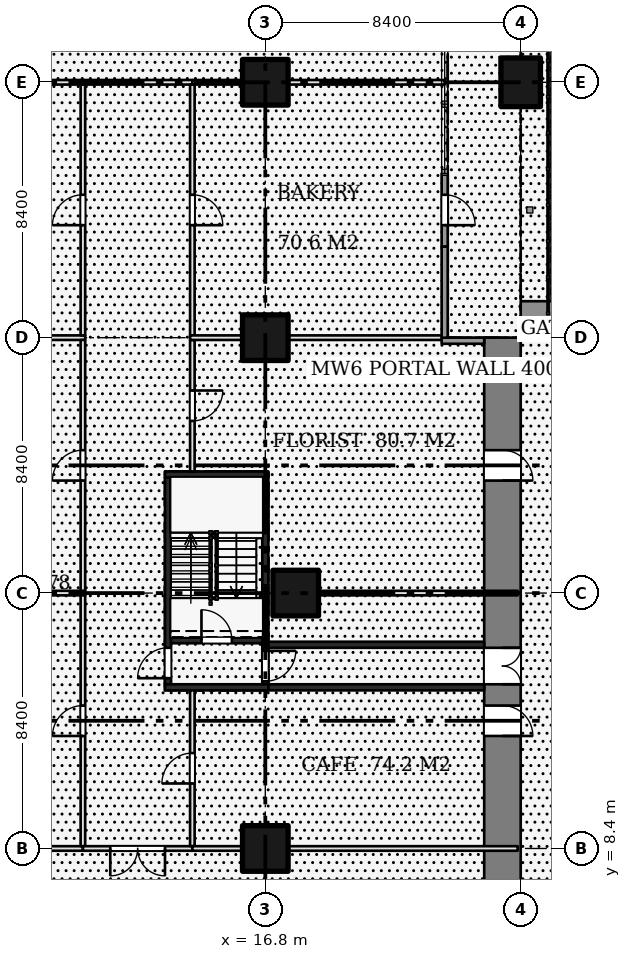
"""IFC4 building model, lengths in metres.
Left out: names, types, materials, properties, quantities, classifications, styles, units other than length and angle.
Written with IfcOpenShell. Run it as: python <this file> out.ifc"""

import sys

from ifc_helpers import new_model, si_unit, direction, frame, frame_2d, origin, origin_2d, place, context, subcontext, project, spatial, polyline, rectangle, outline, extrude, element, fill, save


model = new_model("IFC4")
c1 = context("Model", 3, precision=1e-05, world=origin(), true_north=direction((0.0, 1.0)))
c2 = subcontext(c1, "Body", "Model", "MODEL_VIEW")
j1 = project(units=[si_unit("LENGTHUNIT", "METRE"), si_unit("PLANEANGLEUNIT", "RADIAN")], contexts=[c1])
p1 = place(None, origin())
s1 = spatial("IfcSite", under=j1, at=p1, CompositionType="ELEMENT")
p2 = place(p1, origin())
s2 = spatial("IfcBuilding", under=s1, at=p2, CompositionType="ELEMENT")
p3 = place(p2, origin())
s3 = spatial("IfcBuildingStorey", under=s2, at=p3, CompositionType="ELEMENT", Elevation=0.0)
for number, where, z_axis, x_axis in (
    (1, (16.8, 8.4, 0.0), (0.0, 0.0, 1.0), (1.0, 0.0, 0.0)),
    (2, (17.8, 16.8, 0.0), (0.0, 0.0, 1.0), (1.0, 0.0, 0.0)),
    (3, (16.8, 25.2, 0.0), (0.0, 0.0, 1.0), (1.0, 0.0, 0.0)),
    (4, (16.8, 33.6, 0.0), (0.0, 0.0, 1.0), (1.0, 0.0, 0.0)),
):
    element("IfcColumn", number, at=place(p3, frame(where, z_axis=z_axis, x_axis=x_axis)), inside=s3, PredefinedType="COLUMN", context=c2, shape_type="SweptSolid", body=[
        extrude(rectangle(XDim=1.5, YDim=1.5, at=origin_2d()), origin(), (0.0, 0.0, 1.0), 8.7),
    ])
p4 = place(p3, frame((25.2, 33.6, 0.0), z_axis=(0.0, 0.0, 1.0), x_axis=(0.0, 1.0, 0.0)))
e5 = element("IfcColumn", 5, at=p4, inside=s3, PredefinedType="COLUMN", context=c2, shape_type="SweptSolid", body=[
    extrude(rectangle(XDim=1.6, YDim=1.3, at=origin_2d()), origin(), (0.0, 0.0, 1.0), 8.7),
])
p5 = place(p3, frame((24.6, 0.0, 0.0), z_axis=(0.0, 0.0, 1.0), x_axis=(0.0, 1.0, 0.0)))
e6 = element("IfcWall", 6, at=p5, inside=s3, PredefinedType="SHEAR", context=c2, shape_type="SweptSolid", body=[
    extrude(rectangle(XDim=25.2, YDim=1.2, at=frame_2d((12.6, 0.0))), origin(), (0.0, 0.0, 1.0), 8.7),
])
p6 = place(p5, frame((13.8, 0.0, 0.0)))
e7 = element("IfcOpeningElement", 7, at=p6, cuts=e6, PredefinedType="OPENING", context=c2, shape_type="SweptSolid", body=[
    extrude(rectangle(XDim=1.2, YDim=2.1, at=frame_2d((0.6, 1.05))), frame((0.0, 0.61, 0.0), z_axis=(0.0, -1.0, 0.0), x_axis=(1.0, 0.0, 0.0)), (0.0, 0.0, 1.0), 1.22),
])
p7 = place(p5, frame((12.1, 0.0, 0.0)))
e8 = element("IfcOpeningElement", 8, at=p7, cuts=e6, PredefinedType="OPENING", context=c2, shape_type="SweptSolid", body=[
    extrude(rectangle(XDim=1.0, YDim=2.4, at=frame_2d((0.5, 1.2))), frame((0.0, 0.61, 0.0), z_axis=(0.0, -1.0, 0.0), x_axis=(1.0, 0.0, 0.0)), (0.0, 0.0, 1.0), 1.22),
])
p8 = place(p5, frame((20.5, 0.0, 0.0)))
e9 = element("IfcOpeningElement", 9, at=p8, cuts=e6, PredefinedType="OPENING", context=c2, shape_type="SweptSolid", body=[
    extrude(rectangle(XDim=1.0, YDim=2.4, at=frame_2d((0.5, 1.2))), frame((0.0, 0.61, 0.0), z_axis=(0.0, -1.0, 0.0), x_axis=(1.0, 0.0, 0.0)), (0.0, 0.0, 1.0), 1.22),
])
p9 = place(p3, frame((25.2, 25.8, 9.0), z_axis=(0.0, 1.0, 0.0), x_axis=(1.0, 0.0, 0.0)))
e10 = element("IfcWall", 10, at=p9, inside=s3, PredefinedType="SHEAR", context=c2, shape_type="SweptSolid", body=[
    extrude(outline(polyline([(0.0, 0.0), (2.747, 0.0), (2.413, 0.555), (2.05, 1.305), (1.748, 2.094), (1.51, 2.917), (1.338, 3.764), (1.235, 4.628), (1.2, 5.5), (1.2, 9.15), (0.0, 9.15), (0.0, 0.0)])), origin(), (0.0, 0.0, -1.0), 1.2),
])
p10 = place(p3, frame((13.6, 13.8, 0.0), z_axis=(0.0, 0.0, 1.0), x_axis=(0.0, 1.0, 0.0)))
e11 = element("IfcWall", 11, at=p10, inside=s3, PredefinedType="SHEAR", context=c2, shape_type="SweptSolid", body=[
    extrude(rectangle(XDim=6.8, YDim=0.2, at=frame_2d((3.4, 0.0))), origin(), (0.0, 0.0, 1.0), 8.7),
])
p11 = place(p10, frame((0.2, 0.0, 0.0)))
e12 = element("IfcOpeningElement", 12, at=p11, cuts=e11, PredefinedType="OPENING", context=c2, shape_type="SweptSolid", body=[
    extrude(rectangle(XDim=1.0, YDim=2.1, at=frame_2d((0.5, 1.05))), frame((0.0, 0.11, 0.0), z_axis=(0.0, -1.0, 0.0), x_axis=(1.0, 0.0, 0.0)), (0.0, 0.0, 1.0), 0.22),
])
p12 = place(p3, frame((16.8, 13.8, 0.0), z_axis=(0.0, 0.0, 1.0), x_axis=(0.0, 1.0, 0.0)))
e13 = element("IfcWall", 13, at=p12, inside=s3, PredefinedType="SHEAR", context=c2, shape_type="SweptSolid", body=[
    extrude(rectangle(XDim=6.8, YDim=0.2, at=frame_2d((3.4, 0.0))), origin(), (0.0, 0.0, 1.0), 8.7),
])
p13 = place(p12, frame((0.1, 0.0, 0.0)))
e14 = element("IfcOpeningElement", 14, at=p13, cuts=e13, PredefinedType="OPENING", context=c2, shape_type="SweptSolid", body=[
    extrude(rectangle(XDim=1.0, YDim=2.1, at=frame_2d((0.5, 1.05))), frame((0.0, 0.11, 0.0), z_axis=(0.0, -1.0, 0.0), x_axis=(1.0, 0.0, 0.0)), (0.0, 0.0, 1.0), 0.22),
])
for number, where, z_axis, x_axis in (
    (15, (13.5, 13.7, 0.0), (0.0, 0.0, 1.0), (1.0, 0.0, 0.0)),
    (16, (13.5, 20.7, 0.0), (0.0, 0.0, 1.0), (1.0, 0.0, 0.0)),
):
    element("IfcWall", number, at=place(p3, frame(where, z_axis=z_axis, x_axis=x_axis)), inside=s3, PredefinedType="SHEAR", context=c2, shape_type="SweptSolid", body=[
        extrude(rectangle(XDim=3.4, YDim=0.2, at=frame_2d((1.7, 0.0))), origin(), (0.0, 0.0, 1.0), 8.7),
    ])
p14 = place(p3, frame((13.7, 15.25, 0.0), z_axis=(0.0, 0.0, 1.0), x_axis=(1.0, 0.0, 0.0)))
e17 = element("IfcWall", 17, at=p14, inside=s3, PredefinedType="SHEAR", context=c2, shape_type="SweptSolid", body=[
    extrude(rectangle(XDim=3.0, YDim=0.2, at=frame_2d((1.5, 0.0))), origin(), (0.0, 0.0, 1.0), 8.7),
])
p15 = place(p14, frame((1.0, 0.0, 0.0)))
e18 = element("IfcOpeningElement", 18, at=p15, cuts=e17, PredefinedType="OPENING", context=c2, shape_type="SweptSolid", body=[
    extrude(rectangle(XDim=1.0, YDim=2.1, at=frame_2d((0.5, 1.05))), frame((0.0, 0.11, 0.0), z_axis=(0.0, -1.0, 0.0), x_axis=(1.0, 0.0, 0.0)), (0.0, 0.0, 1.0), 0.22),
])
for number, where, z_axis, x_axis in (
    (19, (16.9, 13.7, 0.0), (0.0, 0.0, 1.0), (1.0, 0.0, 0.0)),
    (20, (16.9, 15.1, 0.0), (0.0, 0.0, 1.0), (1.0, 0.0, 0.0)),
):
    element("IfcWall", number, at=place(p3, frame(where, z_axis=z_axis, x_axis=x_axis)), inside=s3, PredefinedType="SHEAR", context=c2, shape_type="SweptSolid", body=[
        extrude(rectangle(XDim=7.1, YDim=0.2, at=frame_2d((3.55, 0.0))), origin(), (0.0, 0.0, 1.0), 8.7),
    ])
p16 = place(p3, frame((9.15, 8.4, 0.0), z_axis=(0.0, 0.0, 1.0), x_axis=(1.0, 0.0, 0.0)))
e21 = element("IfcWall", 21, at=p16, inside=s3, PredefinedType="PARTITIONING", context=c2, shape_type="SweptSolid", body=[
    extrude(rectangle(XDim=1.65, YDim=0.15, at=frame_2d((0.825, 0.0))), origin(), (0.0, 0.0, 1.0), 8.7),
])
for number, where, z_axis, x_axis in (
    (22, (9.15, 16.8, 0.0), (0.0, 0.0, 1.0), (1.0, 0.0, 0.0)),
    (23, (9.15, 25.2, 0.0), (0.0, 0.0, 1.0), (1.0, 0.0, 0.0)),
):
    element("IfcWall", number, at=place(p3, frame(where, z_axis=z_axis, x_axis=x_axis)), inside=s3, PredefinedType="PARTITIONING", context=c2, shape_type="SweptSolid", body=[
        extrude(rectangle(XDim=1.725, YDim=0.15, at=frame_2d((0.863, 0.0))), origin(), (0.0, 0.0, 1.0), 8.7),
    ])
p17 = place(p3, frame((9.15, 33.6, 0.0), z_axis=(0.0, 0.0, 1.0), x_axis=(1.0, 0.0, 0.0)))
e24 = element("IfcWall", 24, at=p17, inside=s3, PredefinedType="PARTITIONING", context=c2, shape_type="SweptSolid", body=[
    extrude(rectangle(XDim=1.65, YDim=0.15, at=frame_2d((0.825, 0.0))), origin(), (0.0, 0.0, 1.0), 8.7),
])
p18 = place(p3, frame((10.8, 8.475, 0.0), z_axis=(0.0, 0.0, 1.0), x_axis=(0.0, 1.0, 0.0)))
e25 = element("IfcWall", 25, at=p18, inside=s3, PredefinedType="PARTITIONING", context=c2, shape_type="SweptSolid", body=[
    extrude(rectangle(XDim=8.25, YDim=0.15, at=frame_2d((4.125, 0.0))), origin(), (0.0, 0.0, 1.0), 8.7),
])
p19 = place(p18, frame((3.625, 0.0, 0.0)))
e26 = element("IfcOpeningElement", 26, at=p19, cuts=e25, PredefinedType="OPENING", context=c2, shape_type="SweptSolid", body=[
    extrude(rectangle(XDim=1.0, YDim=2.1, at=frame_2d((0.5, 1.05))), frame((0.0, 0.085, 0.0), z_axis=(0.0, -1.0, 0.0), x_axis=(1.0, 0.0, 0.0)), (0.0, 0.0, 1.0), 0.17),
])
p20 = place(p3, frame((10.8, 8.4, 0.0), z_axis=(0.0, 0.0, 1.0), x_axis=(1.0, 0.0, 0.0)))
e27 = element("IfcWall", 27, at=p20, inside=s3, PredefinedType="PARTITIONING", context=c2, shape_type="SweptSolid", body=[
    extrude(rectangle(XDim=3.6, YDim=0.15, at=frame_2d((1.8, 0.0))), origin(), (0.0, 0.0, 1.0), 8.7),
])
p21 = place(p20, frame((0.9, 0.0, 0.0)))
e28 = element("IfcOpeningElement", 28, at=p21, cuts=e27, PredefinedType="OPENING", context=c2, shape_type="SweptSolid", body=[
    extrude(rectangle(XDim=1.8, YDim=2.1, at=frame_2d((0.9, 1.05))), frame((0.0, 0.085, 0.0), z_axis=(0.0, -1.0, 0.0), x_axis=(1.0, 0.0, 0.0)), (0.0, 0.0, 1.0), 0.17),
])
p22 = place(p3, frame((10.8, 16.875, 0.0), z_axis=(0.0, 0.0, 1.0), x_axis=(0.0, 1.0, 0.0)))
e29 = element("IfcWall", 29, at=p22, inside=s3, PredefinedType="PARTITIONING", context=c2, shape_type="SweptSolid", body=[
    extrude(rectangle(XDim=8.25, YDim=0.15, at=frame_2d((4.125, 0.0))), origin(), (0.0, 0.0, 1.0), 8.7),
])
p23 = place(p22, frame((3.625, 0.0, 0.0)))
e30 = element("IfcOpeningElement", 30, at=p23, cuts=e29, PredefinedType="OPENING", context=c2, shape_type="SweptSolid", body=[
    extrude(rectangle(XDim=1.0, YDim=2.1, at=frame_2d((0.5, 1.05))), frame((0.0, 0.085, 0.0), z_axis=(0.0, -1.0, 0.0), x_axis=(1.0, 0.0, 0.0)), (0.0, 0.0, 1.0), 0.17),
])
p24 = place(p3, frame((10.8, 25.275, 0.0), z_axis=(0.0, 0.0, 1.0), x_axis=(0.0, 1.0, 0.0)))
e31 = element("IfcWall", 31, at=p24, inside=s3, PredefinedType="PARTITIONING", context=c2, shape_type="SweptSolid", body=[
    extrude(rectangle(XDim=8.25, YDim=0.15, at=frame_2d((4.125, 0.0))), origin(), (0.0, 0.0, 1.0), 8.7),
])
p25 = place(p24, frame((3.625, 0.0, 0.0)))
e32 = element("IfcOpeningElement", 32, at=p25, cuts=e31, PredefinedType="OPENING", context=c2, shape_type="SweptSolid", body=[
    extrude(rectangle(XDim=1.0, YDim=2.1, at=frame_2d((0.5, 1.05))), frame((0.0, 0.085, 0.0), z_axis=(0.0, -1.0, 0.0), x_axis=(1.0, 0.0, 0.0)), (0.0, 0.0, 1.0), 0.17),
])
p26 = place(p3, frame((10.8, 33.6, 0.0), z_axis=(0.0, 0.0, 1.0), x_axis=(1.0, 0.0, 0.0)))
e33 = element("IfcWall", 33, at=p26, inside=s3, PredefinedType="PARTITIONING", context=c2, shape_type="SweptSolid", body=[
    extrude(rectangle(XDim=3.6, YDim=0.15, at=frame_2d((1.8, 0.0))), origin(), (0.0, 0.0, 1.0), 8.7),
])
p27 = place(p3, frame((14.4, 8.475, 0.0), z_axis=(0.0, 0.0, 1.0), x_axis=(0.0, 1.0, 0.0)))
e34 = element("IfcWall", 34, at=p27, inside=s3, PredefinedType="PARTITIONING", context=c2, shape_type="SweptSolid", body=[
    extrude(rectangle(XDim=5.125, YDim=0.15, at=frame_2d((2.562, 0.0))), origin(), (0.0, 0.0, 1.0), 8.7),
])
p28 = place(p27, frame((2.062, 0.0, 0.0)))
e35 = element("IfcOpeningElement", 35, at=p28, cuts=e34, PredefinedType="OPENING", context=c2, shape_type="SweptSolid", body=[
    extrude(rectangle(XDim=1.0, YDim=2.1, at=frame_2d((0.5, 1.05))), frame((0.0, 0.085, 0.0), z_axis=(0.0, -1.0, 0.0), x_axis=(1.0, 0.0, 0.0)), (0.0, 0.0, 1.0), 0.17),
])
p29 = place(p3, frame((14.4, 8.4, 0.0), z_axis=(0.0, 0.0, 1.0), x_axis=(1.0, 0.0, 0.0)))
e36 = element("IfcWall", 36, at=p29, inside=s3, PredefinedType="PARTITIONING", context=c2, shape_type="SweptSolid", body=[
    extrude(rectangle(XDim=1.65, YDim=0.15, at=frame_2d((0.825, 0.0))), origin(), (0.0, 0.0, 1.0), 8.7),
])
p30 = place(p3, frame((17.55, 8.4, 0.0), z_axis=(0.0, 0.0, 1.0), x_axis=(1.0, 0.0, 0.0)))
e37 = element("IfcWall", 37, at=p30, inside=s3, PredefinedType="PARTITIONING", context=c2, shape_type="SweptSolid", body=[
    extrude(rectangle(XDim=7.55, YDim=0.15, at=frame_2d((3.775, 0.0))), origin(), (0.0, 0.0, 1.0), 8.7),
])
p31 = place(p3, frame((14.4, 20.8, 0.0), z_axis=(0.0, 0.0, 1.0), x_axis=(0.0, 1.0, 0.0)))
e38 = element("IfcWall", 38, at=p31, inside=s3, PredefinedType="PARTITIONING", context=c2, shape_type="SweptSolid", body=[
    extrude(rectangle(XDim=4.325, YDim=0.15, at=frame_2d((2.163, 0.0))), origin(), (0.0, 0.0, 1.0), 8.7),
])
p32 = place(p31, frame((1.663, 0.0, 0.0)))
e39 = element("IfcOpeningElement", 39, at=p32, cuts=e38, PredefinedType="OPENING", context=c2, shape_type="SweptSolid", body=[
    extrude(rectangle(XDim=1.0, YDim=2.1, at=frame_2d((0.5, 1.05))), frame((0.0, 0.085, 0.0), z_axis=(0.0, -1.0, 0.0), x_axis=(1.0, 0.0, 0.0)), (0.0, 0.0, 1.0), 0.17),
])
p33 = place(p3, frame((14.4, 25.275, 0.0), z_axis=(0.0, 0.0, 1.0), x_axis=(0.0, 1.0, 0.0)))
e40 = element("IfcWall", 40, at=p33, inside=s3, PredefinedType="PARTITIONING", context=c2, shape_type="SweptSolid", body=[
    extrude(rectangle(XDim=8.25, YDim=0.15, at=frame_2d((4.125, 0.0))), origin(), (0.0, 0.0, 1.0), 8.7),
])
p34 = place(p33, frame((3.625, 0.0, 0.0)))
e41 = element("IfcOpeningElement", 41, at=p34, cuts=e40, PredefinedType="OPENING", context=c2, shape_type="SweptSolid", body=[
    extrude(rectangle(XDim=1.0, YDim=2.1, at=frame_2d((0.5, 1.05))), frame((0.0, 0.085, 0.0), z_axis=(0.0, -1.0, 0.0), x_axis=(1.0, 0.0, 0.0)), (0.0, 0.0, 1.0), 0.17),
])
p35 = place(p3, frame((14.325, 25.2, 0.0), z_axis=(0.0, 0.0, 1.0), x_axis=(1.0, 0.0, 0.0)))
e42 = element("IfcWall", 42, at=p35, inside=s3, PredefinedType="PARTITIONING", context=c2, shape_type="SweptSolid", body=[
    extrude(rectangle(XDim=1.725, YDim=0.15, at=frame_2d((0.863, 0.0))), origin(), (0.0, 0.0, 1.0), 8.7),
])
p36 = place(p3, frame((17.55, 25.2, 0.0), z_axis=(0.0, 0.0, 1.0), x_axis=(1.0, 0.0, 0.0)))
e43 = element("IfcWall", 43, at=p36, inside=s3, PredefinedType="PARTITIONING", context=c2, shape_type="SweptSolid", body=[
    extrude(rectangle(XDim=5.15, YDim=0.15, at=frame_2d((2.575, 0.0))), origin(), (0.0, 0.0, 1.0), 8.7),
])
p37 = place(p3, frame((14.4, 33.6, 0.0), z_axis=(0.0, 0.0, 1.0), x_axis=(1.0, 0.0, 0.0)))
e44 = element("IfcWall", 44, at=p37, inside=s3, PredefinedType="PARTITIONING", context=c2, shape_type="SweptSolid", body=[
    extrude(rectangle(XDim=1.65, YDim=0.15, at=frame_2d((0.825, 0.0))), origin(), (0.0, 0.0, 1.0), 8.7),
])
p38 = place(p3, frame((17.55, 33.6, 0.0), z_axis=(0.0, 0.0, 1.0), x_axis=(1.0, 0.0, 0.0)))
e45 = element("IfcWall", 45, at=p38, inside=s3, PredefinedType="PARTITIONING", context=c2, shape_type="SweptSolid", body=[
    extrude(rectangle(XDim=5.15, YDim=0.15, at=frame_2d((2.575, 0.0))), origin(), (0.0, 0.0, 1.0), 8.7),
])
p39 = place(p3, frame((18.55, 16.8, 0.0), z_axis=(0.0, 0.0, 1.0), x_axis=(1.0, 0.0, 0.0)))
e46 = element("IfcWall", 46, at=p39, inside=s3, PredefinedType="PARTITIONING", context=c2, shape_type="SweptSolid", body=[
    extrude(rectangle(XDim=6.55, YDim=0.15, at=frame_2d((3.275, 0.0))), origin(), (0.0, 0.0, 1.0), 8.7),
])
p40 = place(p3, frame((24.0, 25.1, 0.0), z_axis=(0.0, 0.0, 1.0), x_axis=(-1.0, 0.0, 0.0)))
e47 = element("IfcWall", 47, at=p40, inside=s3, PredefinedType="SOLIDWALL", context=c2, shape_type="SweptSolid", body=[
    extrude(rectangle(XDim=1.4, YDim=0.2, at=frame_2d((0.7, 0.0))), origin(), (0.0, 0.0, 1.0), 8.7),
])
p41 = place(p3, frame((22.7, 25.2, 0.0), z_axis=(0.0, 0.0, 1.0), x_axis=(0.0, 1.0, 0.0)))
e48 = element("IfcWall", 48, at=p41, inside=s3, PredefinedType="SOLIDWALL", context=c2, shape_type="SweptSolid", body=[
    extrude(rectangle(XDim=3.0, YDim=0.2, at=frame_2d((1.5, 0.0))), origin(), (0.0, 0.0, 1.0), 8.7),
])
p42 = place(p3, frame((22.7, 28.2, 0.0), z_axis=(0.0, 0.0, 1.0), x_axis=(0.0, 1.0, 0.0)))
e49 = element("IfcWall", 49, at=p42, inside=s3, PredefinedType="SOLIDWALL", context=c2, shape_type="SweptSolid", body=[
    extrude(rectangle(XDim=2.4, YDim=0.2, at=frame_2d((1.2, 0.0))), origin(), (0.0, 0.0, 1.0), 8.7),
])
p43 = place(p42, frame((0.7, 0.0, 0.0)))
e50 = element("IfcOpeningElement", 50, at=p43, cuts=e49, PredefinedType="OPENING", context=c2, shape_type="SweptSolid", body=[
    extrude(rectangle(XDim=1.0, YDim=2.4, at=frame_2d((0.5, 1.2))), frame((0.0, 0.11, 0.0), z_axis=(0.0, -1.0, 0.0), x_axis=(1.0, 0.0, 0.0)), (0.0, 0.0, 1.0), 0.22),
])
p44 = place(p11, origin())
e51 = element("IfcDoor", 51, at=p44, inside=s3, OperationType="SINGLE_SWING_LEFT", PredefinedType="DOOR", context=c2, shape_type="SweptSolid", body=[
    extrude(rectangle(XDim=1.0, YDim=2.1, at=frame_2d((0.5, 1.05))), frame((0.0, 0.025, 0.0), z_axis=(0.0, -1.0, 0.0), x_axis=(1.0, 0.0, 0.0)), (0.0, 0.0, 1.0), 0.05),
])
fill(e12, e51)
p45 = place(p13, frame((1.0, 0.0, 0.0), z_axis=(0.0, 0.0, 1.0), x_axis=(-1.0, 0.0, 0.0)))
e52 = element("IfcDoor", 52, at=p45, inside=s3, OperationType="SINGLE_SWING_LEFT", PredefinedType="DOOR", context=c2, shape_type="SweptSolid", body=[
    extrude(rectangle(XDim=1.0, YDim=2.1, at=frame_2d((0.5, 1.05))), frame((0.0, 0.025, 0.0), z_axis=(0.0, -1.0, 0.0), x_axis=(1.0, 0.0, 0.0)), (0.0, 0.0, 1.0), 0.05),
])
fill(e14, e52)
p46 = place(p15, origin())
e53 = element("IfcDoor", 53, at=p46, inside=s3, OperationType="SINGLE_SWING_LEFT", PredefinedType="DOOR", context=c2, shape_type="SweptSolid", body=[
    extrude(rectangle(XDim=1.0, YDim=2.1, at=frame_2d((0.5, 1.05))), frame((0.0, 0.025, 0.0), z_axis=(0.0, -1.0, 0.0), x_axis=(1.0, 0.0, 0.0)), (0.0, 0.0, 1.0), 0.05),
])
fill(e18, e53)
p47 = place(p6, frame((1.2, 0.0, 0.0), z_axis=(0.0, 0.0, 1.0), x_axis=(-1.0, 0.0, 0.0)))
e54 = element("IfcDoor", 54, at=p47, inside=s3, OperationType="DOUBLE_DOOR_SINGLE_SWING", PredefinedType="DOOR", context=c2, shape_type="SweptSolid", body=[
    extrude(rectangle(XDim=1.2, YDim=2.1, at=frame_2d((0.6, 1.05))), frame((0.0, 0.025, 0.0), z_axis=(0.0, -1.0, 0.0), x_axis=(1.0, 0.0, 0.0)), (0.0, 0.0, 1.0), 0.05),
])
fill(e7, e54)
p48 = place(p19, origin())
e55 = element("IfcDoor", 55, at=p48, inside=s3, OperationType="SINGLE_SWING_LEFT", PredefinedType="DOOR", context=c2, shape_type="SweptSolid", body=[
    extrude(rectangle(XDim=1.0, YDim=2.1, at=frame_2d((0.5, 1.05))), frame((0.0, 0.025, 0.0), z_axis=(0.0, -1.0, 0.0), x_axis=(1.0, 0.0, 0.0)), (0.0, 0.0, 1.0), 0.05),
])
fill(e26, e55)
p49 = place(p23, origin())
e56 = element("IfcDoor", 56, at=p49, inside=s3, OperationType="SINGLE_SWING_LEFT", PredefinedType="DOOR", context=c2, shape_type="SweptSolid", body=[
    extrude(rectangle(XDim=1.0, YDim=2.1, at=frame_2d((0.5, 1.05))), frame((0.0, 0.025, 0.0), z_axis=(0.0, -1.0, 0.0), x_axis=(1.0, 0.0, 0.0)), (0.0, 0.0, 1.0), 0.05),
])
fill(e30, e56)
p50 = place(p25, origin())
e57 = element("IfcDoor", 57, at=p50, inside=s3, OperationType="SINGLE_SWING_LEFT", PredefinedType="DOOR", context=c2, shape_type="SweptSolid", body=[
    extrude(rectangle(XDim=1.0, YDim=2.1, at=frame_2d((0.5, 1.05))), frame((0.0, 0.025, 0.0), z_axis=(0.0, -1.0, 0.0), x_axis=(1.0, 0.0, 0.0)), (0.0, 0.0, 1.0), 0.05),
])
fill(e32, e57)
p51 = place(p28, origin())
e58 = element("IfcDoor", 58, at=p51, inside=s3, OperationType="SINGLE_SWING_LEFT", PredefinedType="DOOR", context=c2, shape_type="SweptSolid", body=[
    extrude(rectangle(XDim=1.0, YDim=2.1, at=frame_2d((0.5, 1.05))), frame((0.0, 0.025, 0.0), z_axis=(0.0, -1.0, 0.0), x_axis=(1.0, 0.0, 0.0)), (0.0, 0.0, 1.0), 0.05),
])
fill(e35, e58)
p52 = place(p32, frame((1.0, 0.0, 0.0), z_axis=(0.0, 0.0, 1.0), x_axis=(-1.0, 0.0, 0.0)))
e59 = element("IfcDoor", 59, at=p52, inside=s3, OperationType="SINGLE_SWING_LEFT", PredefinedType="DOOR", context=c2, shape_type="SweptSolid", body=[
    extrude(rectangle(XDim=1.0, YDim=2.1, at=frame_2d((0.5, 1.05))), frame((0.0, 0.025, 0.0), z_axis=(0.0, -1.0, 0.0), x_axis=(1.0, 0.0, 0.0)), (0.0, 0.0, 1.0), 0.05),
])
fill(e39, e59)
p53 = place(p34, frame((1.0, 0.0, 0.0), z_axis=(0.0, 0.0, 1.0), x_axis=(-1.0, 0.0, 0.0)))
e60 = element("IfcDoor", 60, at=p53, inside=s3, OperationType="SINGLE_SWING_RIGHT", PredefinedType="DOOR", context=c2, shape_type="SweptSolid", body=[
    extrude(rectangle(XDim=1.0, YDim=2.1, at=frame_2d((0.5, 1.05))), frame((0.0, 0.025, 0.0), z_axis=(0.0, -1.0, 0.0), x_axis=(1.0, 0.0, 0.0)), (0.0, 0.0, 1.0), 0.05),
])
fill(e41, e60)
p54 = place(p21, frame((1.8, 0.0, 0.0), z_axis=(0.0, 0.0, 1.0), x_axis=(-1.0, 0.0, 0.0)))
e61 = element("IfcDoor", 61, at=p54, inside=s3, OperationType="DOUBLE_DOOR_SINGLE_SWING", PredefinedType="DOOR", context=c2, shape_type="SweptSolid", body=[
    extrude(rectangle(XDim=1.8, YDim=2.1, at=frame_2d((0.9, 1.05))), frame((0.0, 0.025, 0.0), z_axis=(0.0, -1.0, 0.0), x_axis=(1.0, 0.0, 0.0)), (0.0, 0.0, 1.0), 0.05),
])
fill(e28, e61)
p55 = place(p43, frame((1.0, 0.0, 0.0), z_axis=(0.0, 0.0, 1.0), x_axis=(-1.0, 0.0, 0.0)))
e62 = element("IfcDoor", 62, at=p55, inside=s3, OperationType="SINGLE_SWING_RIGHT", PredefinedType="DOOR", context=c2, shape_type="SweptSolid", body=[
    extrude(rectangle(XDim=1.0, YDim=2.4, at=frame_2d((0.5, 1.2))), frame((0.0, 0.025, 0.0), z_axis=(0.0, -1.0, 0.0), x_axis=(1.0, 0.0, 0.0)), (0.0, 0.0, 1.0), 0.05),
])
fill(e50, e62)
p56 = place(p7, frame((1.0, 0.0, 0.0), z_axis=(0.0, 0.0, 1.0), x_axis=(-1.0, 0.0, 0.0)))
e63 = element("IfcDoor", 63, at=p56, inside=s3, OperationType="SINGLE_SWING_RIGHT", PredefinedType="DOOR", context=c2, shape_type="SweptSolid", body=[
    extrude(rectangle(XDim=1.0, YDim=2.4, at=frame_2d((0.5, 1.2))), frame((0.0, 0.025, 0.0), z_axis=(0.0, -1.0, 0.0), x_axis=(1.0, 0.0, 0.0)), (0.0, 0.0, 1.0), 0.05),
])
fill(e8, e63)
p57 = place(p8, frame((1.0, 0.0, 0.0), z_axis=(0.0, 0.0, 1.0), x_axis=(-1.0, 0.0, 0.0)))
e64 = element("IfcDoor", 64, at=p57, inside=s3, OperationType="SINGLE_SWING_RIGHT", PredefinedType="DOOR", context=c2, shape_type="SweptSolid", body=[
    extrude(rectangle(XDim=1.0, YDim=2.4, at=frame_2d((0.5, 1.2))), frame((0.0, 0.025, 0.0), z_axis=(0.0, -1.0, 0.0), x_axis=(1.0, 0.0, 0.0)), (0.0, 0.0, 1.0), 0.05),
])
fill(e9, e64)
save(model, sys.argv[1])
